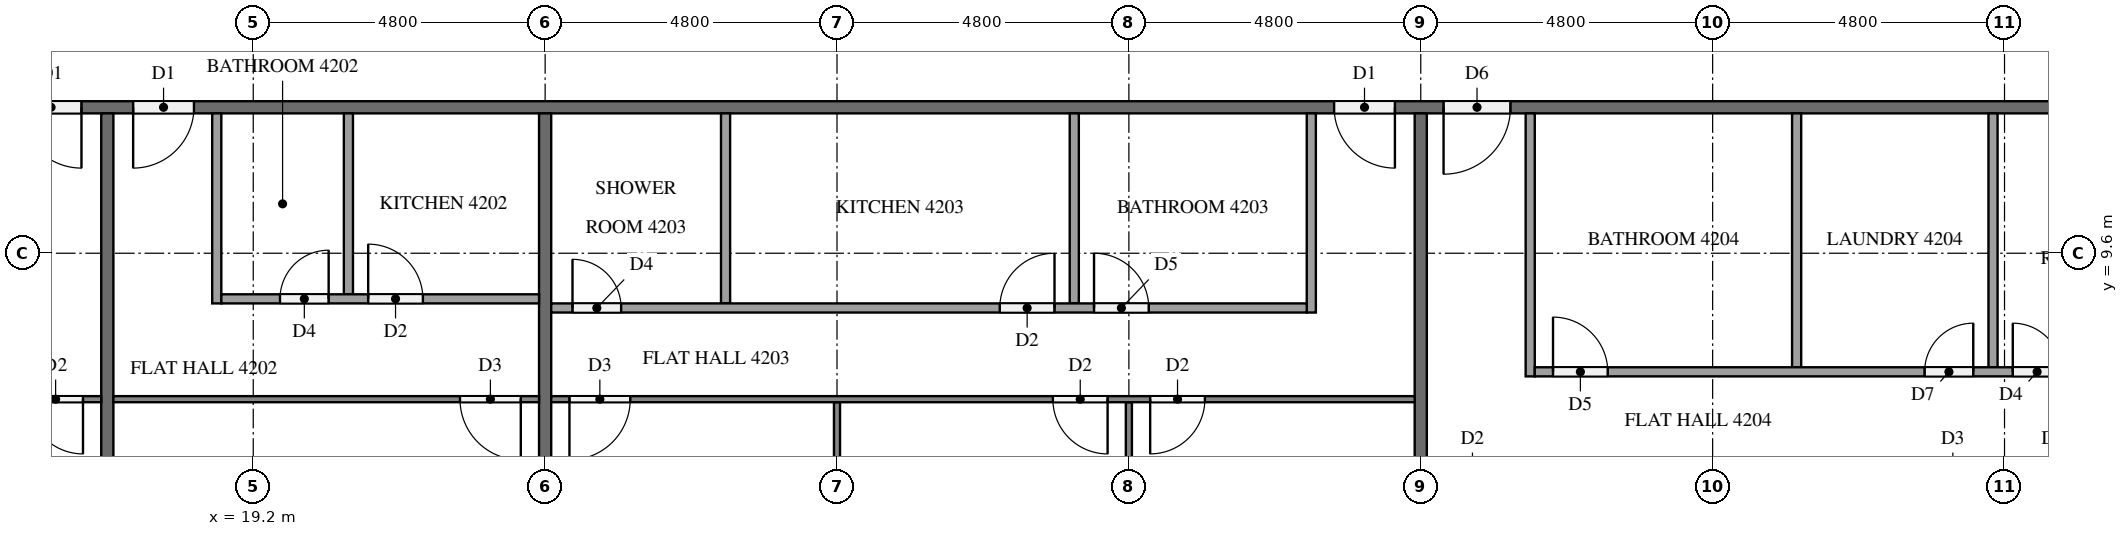
"""IFC4 building model, lengths in metres.
Left out: names, types, materials, properties, quantities, classifications, styles, units other than length and angle.
Written with IfcOpenShell. Run it as: python <this file> out.ifc"""

import sys

from ifc_helpers import new_model, si_unit, direction, frame, frame_2d, origin, place, context, subcontext, project, spatial, rectangle, extrude, element, fill, save


model = new_model("IFC4")
c1 = context("Model", 3, precision=1e-05, world=origin(), true_north=direction((0.0, 1.0)))
c2 = subcontext(c1, "Body", "Model", "MODEL_VIEW")
j1 = project(units=[si_unit("LENGTHUNIT", "METRE"), si_unit("PLANEANGLEUNIT", "RADIAN")], contexts=[c1])
p1 = place(None, origin())
s1 = spatial("IfcSite", under=j1, at=p1, CompositionType="ELEMENT")
p2 = place(p1, origin())
s2 = spatial("IfcBuilding", under=s1, at=p2, CompositionType="ELEMENT")
p3 = place(p2, frame((0.0, 0.0, 163.0)))
s3 = spatial("IfcBuildingStorey", under=s2, at=p3, CompositionType="ELEMENT", Elevation=163.0)
p4 = place(p3, frame((50.5, 12.0, 0.0), z_axis=(0.0, 0.0, 1.0), x_axis=(-1.0, 0.0, 0.0)))
e1 = element("IfcWall", 1, at=p4, inside=s3, PredefinedType="PARTITIONING", context=c2, shape_type="SweptSolid", body=[
    extrude(rectangle(XDim=38.6, YDim=0.2, at=frame_2d((19.3, 0.0))), origin(), (0.0, 0.0, 1.0), 3.2),
])
p5 = place(p4, frame((34.125, 0.0, 0.0)))
e2 = element("IfcOpeningElement", 2, at=p5, cuts=e1, PredefinedType="OPENING", context=c2, shape_type="SweptSolid", body=[
    extrude(rectangle(XDim=1.0, YDim=2.1, at=frame_2d((0.5, 1.05))), frame((0.0, 0.11, 0.0), z_axis=(0.0, -1.0, 0.0), x_axis=(1.0, 0.0, 0.0)), (0.0, 0.0, 1.0), 0.22),
])
p6 = place(p4, frame((32.275, 0.0, 0.0)))
e3 = element("IfcOpeningElement", 3, at=p6, cuts=e1, PredefinedType="OPENING", context=c2, shape_type="SweptSolid", body=[
    extrude(rectangle(XDim=1.0, YDim=2.1, at=frame_2d((0.5, 1.05))), frame((0.0, 0.11, 0.0), z_axis=(0.0, -1.0, 0.0), x_axis=(1.0, 0.0, 0.0)), (0.0, 0.0, 1.0), 0.22),
])
p7 = place(p4, frame((12.525, 0.0, 0.0)))
e4 = element("IfcOpeningElement", 4, at=p7, cuts=e1, PredefinedType="OPENING", context=c2, shape_type="SweptSolid", body=[
    extrude(rectangle(XDim=1.0, YDim=2.1, at=frame_2d((0.5, 1.05))), frame((0.0, 0.11, 0.0), z_axis=(0.0, -1.0, 0.0), x_axis=(1.0, 0.0, 0.0)), (0.0, 0.0, 1.0), 0.22),
])
p8 = place(p4, frame((10.625, 0.0, 0.0)))
e5 = element("IfcOpeningElement", 5, at=p8, cuts=e1, PredefinedType="OPENING", context=c2, shape_type="SweptSolid", body=[
    extrude(rectangle(XDim=1.1, YDim=2.1, at=frame_2d((0.55, 1.05))), frame((0.0, 0.11, 0.0), z_axis=(0.0, -1.0, 0.0), x_axis=(1.0, 0.0, 0.0)), (0.0, 0.0, 1.0), 0.22),
])
p9 = place(p3, frame((16.8, 11.9, 0.0), z_axis=(0.0, 0.0, 1.0), x_axis=(0.0, -1.0, 0.0)))
e6 = element("IfcWall", 6, at=p9, inside=s3, PredefinedType="PARTITIONING", context=c2, shape_type="SweptSolid", body=[
    extrude(rectangle(XDim=11.8, YDim=0.2, at=frame_2d((5.9, 0.0))), origin(), (0.0, 0.0, 1.0), 3.2),
])
p10 = place(p3, frame((24.0, 11.9, 0.0), z_axis=(0.0, 0.0, 1.0), x_axis=(0.0, -1.0, 0.0)))
e7 = element("IfcWall", 7, at=p10, inside=s3, PredefinedType="PARTITIONING", context=c2, shape_type="SweptSolid", body=[
    extrude(rectangle(XDim=11.525, YDim=0.2, at=frame_2d((5.762, 0.0))), origin(), (0.0, 0.0, 1.0), 3.2),
])
p11 = place(p3, frame((38.4, 11.9, 0.0), z_axis=(0.0, 0.0, 1.0), x_axis=(0.0, -1.0, 0.0)))
e8 = element("IfcWall", 8, at=p11, inside=s3, PredefinedType="PARTITIONING", context=c2, shape_type="SweptSolid", body=[
    extrude(rectangle(XDim=11.8, YDim=0.2, at=frame_2d((5.9, 0.0))), origin(), (0.0, 0.0, 1.0), 3.2),
])
p12 = place(p3, frame((16.7, 7.2, 0.0), z_axis=(0.0, 0.0, 1.0), x_axis=(-1.0, 0.0, 0.0)))
e9 = element("IfcWall", 9, at=p12, inside=s3, PredefinedType="PARTITIONING", context=c2, shape_type="SweptSolid", body=[
    extrude(rectangle(XDim=16.6, YDim=0.1, at=frame_2d((8.3, 0.0))), origin(), (0.0, 0.0, 1.0), 3.2),
])
p13 = place(p12, frame((0.3, 0.0, 0.0)))
e10 = element("IfcOpeningElement", 10, at=p13, cuts=e9, PredefinedType="OPENING", context=c2, shape_type="SweptSolid", body=[
    extrude(rectangle(XDim=0.9, YDim=2.1, at=frame_2d((0.45, 1.05))), frame((0.0, 0.06, 0.0), z_axis=(0.0, -1.0, 0.0), x_axis=(1.0, 0.0, 0.0)), (0.0, 0.0, 1.0), 0.12),
])
p14 = place(p12, frame((10.55, 0.0, 0.0)))
e11 = element("IfcOpeningElement", 11, at=p14, cuts=e9, PredefinedType="OPENING", context=c2, shape_type="SweptSolid", body=[
    extrude(rectangle(XDim=1.0, YDim=2.1, at=frame_2d((0.5, 1.05))), frame((0.0, 0.06, 0.0), z_axis=(0.0, -1.0, 0.0), x_axis=(1.0, 0.0, 0.0)), (0.0, 0.0, 1.0), 0.12),
])
p15 = place(p12, frame((12.25, 0.0, 0.0)))
e12 = element("IfcOpeningElement", 12, at=p15, cuts=e9, PredefinedType="OPENING", context=c2, shape_type="SweptSolid", body=[
    extrude(rectangle(XDim=0.9, YDim=2.1, at=frame_2d((0.45, 1.05))), frame((0.0, 0.06, 0.0), z_axis=(0.0, -1.0, 0.0), x_axis=(1.0, 0.0, 0.0)), (0.0, 0.0, 1.0), 0.12),
])
p16 = place(p3, frame((23.9, 7.2, 0.0), z_axis=(0.0, 0.0, 1.0), x_axis=(-1.0, 0.0, 0.0)))
e13 = element("IfcWall", 13, at=p16, inside=s3, PredefinedType="PARTITIONING", context=c2, shape_type="SweptSolid", body=[
    extrude(rectangle(XDim=7.0, YDim=0.1, at=frame_2d((3.5, 0.0))), origin(), (0.0, 0.0, 1.0), 3.2),
])
p17 = place(p16, frame((0.3, 0.0, 0.0)))
e14 = element("IfcOpeningElement", 14, at=p17, cuts=e13, PredefinedType="OPENING", context=c2, shape_type="SweptSolid", body=[
    extrude(rectangle(XDim=1.0, YDim=2.1, at=frame_2d((0.5, 1.05))), frame((0.0, 0.06, 0.0), z_axis=(0.0, -1.0, 0.0), x_axis=(1.0, 0.0, 0.0)), (0.0, 0.0, 1.0), 0.12),
])
p18 = place(p3, frame((20.765, 11.9, 0.0), z_axis=(0.0, 0.0, 1.0), x_axis=(0.0, -1.0, 0.0)))
e15 = element("IfcWall", 15, at=p18, inside=s3, PredefinedType="PARTITIONING", context=c2, shape_type="SweptSolid", body=[
    extrude(rectangle(XDim=2.975, YDim=0.15, at=frame_2d((1.487, 0.0))), origin(), (0.0, 0.0, 1.0), 3.2),
])
p19 = place(p3, frame((18.6, 11.9, 0.0), z_axis=(0.0, 0.0, 1.0), x_axis=(0.0, -1.0, 0.0)))
e16 = element("IfcWall", 16, at=p19, inside=s3, PredefinedType="PARTITIONING", context=c2, shape_type="SweptSolid", body=[
    extrude(rectangle(XDim=3.125, YDim=0.15, at=frame_2d((1.562, 0.0))), origin(), (0.0, 0.0, 1.0), 3.2),
])
p20 = place(p3, frame((18.675, 8.85, 0.0), z_axis=(0.0, 0.0, 1.0), x_axis=(1.0, 0.0, 0.0)))
e17 = element("IfcWall", 17, at=p20, inside=s3, PredefinedType="PARTITIONING", context=c2, shape_type="SweptSolid", body=[
    extrude(rectangle(XDim=5.225, YDim=0.15, at=frame_2d((2.612, 0.0))), origin(), (0.0, 0.0, 1.0), 3.2),
])
p21 = place(p20, frame((0.965, 0.0, 0.0)))
e18 = element("IfcOpeningElement", 18, at=p21, cuts=e17, PredefinedType="OPENING", context=c2, shape_type="SweptSolid", body=[
    extrude(rectangle(XDim=0.8, YDim=2.1, at=frame_2d((0.4, 1.05))), frame((0.0, 0.085, 0.0), z_axis=(0.0, -1.0, 0.0), x_axis=(1.0, 0.0, 0.0)), (0.0, 0.0, 1.0), 0.17),
])
p22 = place(p20, frame((2.415, 0.0, 0.0)))
e19 = element("IfcOpeningElement", 19, at=p22, cuts=e17, PredefinedType="OPENING", context=c2, shape_type="SweptSolid", body=[
    extrude(rectangle(XDim=0.9, YDim=2.1, at=frame_2d((0.45, 1.05))), frame((0.0, 0.085, 0.0), z_axis=(0.0, -1.0, 0.0), x_axis=(1.0, 0.0, 0.0)), (0.0, 0.0, 1.0), 0.17),
])
p23 = place(p3, frame((33.6, 7.15, 0.0), z_axis=(0.0, 0.0, 1.0), x_axis=(0.0, -1.0, 0.0)))
e20 = element("IfcWall", 20, at=p23, inside=s3, PredefinedType="PARTITIONING", context=c2, shape_type="SweptSolid", body=[
    extrude(rectangle(XDim=6.775, YDim=0.1, at=frame_2d((3.387, 0.0))), origin(), (0.0, 0.0, 1.0), 3.2),
])
p24 = place(p3, frame((28.8, 7.15, 0.0), z_axis=(0.0, 0.0, 1.0), x_axis=(0.0, -1.0, 0.0)))
e21 = element("IfcWall", 21, at=p24, inside=s3, PredefinedType="PARTITIONING", context=c2, shape_type="SweptSolid", body=[
    extrude(rectangle(XDim=7.05, YDim=0.1, at=frame_2d((3.525, 0.0))), origin(), (0.0, 0.0, 1.0), 3.2),
])
p25 = place(p3, frame((38.3, 7.2, 0.0), z_axis=(0.0, 0.0, 1.0), x_axis=(-1.0, 0.0, 0.0)))
e22 = element("IfcWall", 22, at=p25, inside=s3, PredefinedType="PARTITIONING", context=c2, shape_type="SweptSolid", body=[
    extrude(rectangle(XDim=14.2, YDim=0.1, at=frame_2d((7.1, 0.0))), origin(), (0.0, 0.0, 1.0), 3.2),
])
p26 = place(p25, frame((3.45, 0.0, 0.0)))
e23 = element("IfcOpeningElement", 23, at=p26, cuts=e22, PredefinedType="OPENING", context=c2, shape_type="SweptSolid", body=[
    extrude(rectangle(XDim=0.9, YDim=2.1, at=frame_2d((0.45, 1.05))), frame((0.0, 0.06, 0.0), z_axis=(0.0, -1.0, 0.0), x_axis=(1.0, 0.0, 0.0)), (0.0, 0.0, 1.0), 0.12),
])
p27 = place(p25, frame((5.05, 0.0, 0.0)))
e24 = element("IfcOpeningElement", 24, at=p27, cuts=e22, PredefinedType="OPENING", context=c2, shape_type="SweptSolid", body=[
    extrude(rectangle(XDim=0.9, YDim=2.1, at=frame_2d((0.45, 1.05))), frame((0.0, 0.06, 0.0), z_axis=(0.0, -1.0, 0.0), x_axis=(1.0, 0.0, 0.0)), (0.0, 0.0, 1.0), 0.12),
])
p28 = place(p25, frame((12.9, 0.0, 0.0)))
e25 = element("IfcOpeningElement", 25, at=p28, cuts=e22, PredefinedType="OPENING", context=c2, shape_type="SweptSolid", body=[
    extrude(rectangle(XDim=1.0, YDim=2.1, at=frame_2d((0.5, 1.05))), frame((0.0, 0.06, 0.0), z_axis=(0.0, -1.0, 0.0), x_axis=(1.0, 0.0, 0.0)), (0.0, 0.0, 1.0), 0.12),
])
for number, where, z_axis, x_axis in (
    (26, (32.702, 11.9, 0.0), (0.0, 0.0, 1.0), (0.0, -1.0, 0.0)),
    (27, (26.967, 11.9, 0.0), (0.0, 0.0, 1.0), (0.0, -1.0, 0.0)),
):
    element("IfcWall", number, at=place(p3, frame(where, z_axis=z_axis, x_axis=x_axis)), inside=s3, PredefinedType="PARTITIONING", context=c2, shape_type="SweptSolid", body=[
        extrude(rectangle(XDim=3.125, YDim=0.15, at=frame_2d((1.562, 0.0))), origin(), (0.0, 0.0, 1.0), 3.2),
    ])
p29 = place(p3, frame((36.6, 11.9, 0.0), z_axis=(0.0, 0.0, 1.0), x_axis=(0.0, -1.0, 0.0)))
e28 = element("IfcWall", 28, at=p29, inside=s3, PredefinedType="PARTITIONING", context=c2, shape_type="SweptSolid", body=[
    extrude(rectangle(XDim=3.275, YDim=0.15, at=frame_2d((1.637, 0.0))), origin(), (0.0, 0.0, 1.0), 3.2),
])
p30 = place(p3, frame((24.1, 8.7, 0.0), z_axis=(0.0, 0.0, 1.0), x_axis=(1.0, 0.0, 0.0)))
e29 = element("IfcWall", 29, at=p30, inside=s3, PredefinedType="PARTITIONING", context=c2, shape_type="SweptSolid", body=[
    extrude(rectangle(XDim=12.425, YDim=0.15, at=frame_2d((6.212, 0.0))), origin(), (0.0, 0.0, 1.0), 3.2),
])
p31 = place(p30, frame((8.927, 0.0, 0.0)))
e30 = element("IfcOpeningElement", 30, at=p31, cuts=e29, PredefinedType="OPENING", context=c2, shape_type="SweptSolid", body=[
    extrude(rectangle(XDim=0.9, YDim=2.1, at=frame_2d((0.45, 1.05))), frame((0.0, 0.085, 0.0), z_axis=(0.0, -1.0, 0.0), x_axis=(1.0, 0.0, 0.0)), (0.0, 0.0, 1.0), 0.17),
])
p32 = place(p30, frame((7.377, 0.0, 0.0)))
e31 = element("IfcOpeningElement", 31, at=p32, cuts=e29, PredefinedType="OPENING", context=c2, shape_type="SweptSolid", body=[
    extrude(rectangle(XDim=0.9, YDim=2.1, at=frame_2d((0.45, 1.05))), frame((0.0, 0.085, 0.0), z_axis=(0.0, -1.0, 0.0), x_axis=(1.0, 0.0, 0.0)), (0.0, 0.0, 1.0), 0.17),
])
p33 = place(p30, frame((0.35, 0.0, 0.0)))
e32 = element("IfcOpeningElement", 32, at=p33, cuts=e29, PredefinedType="OPENING", context=c2, shape_type="SweptSolid", body=[
    extrude(rectangle(XDim=0.8, YDim=2.1, at=frame_2d((0.4, 1.05))), frame((0.0, 0.085, 0.0), z_axis=(0.0, -1.0, 0.0), x_axis=(1.0, 0.0, 0.0)), (0.0, 0.0, 1.0), 0.17),
])
for number, where, z_axis, x_axis in (
    (33, (44.581, 11.9, 0.0), (0.0, 0.0, 1.0), (0.0, -1.0, 0.0)),
    (34, (47.811, 11.9, 0.0), (0.0, 0.0, 1.0), (0.0, -1.0, 0.0)),
):
    element("IfcWall", number, at=place(p3, frame(where, z_axis=z_axis, x_axis=x_axis)), inside=s3, PredefinedType="PARTITIONING", context=c2, shape_type="SweptSolid", body=[
        extrude(rectangle(XDim=4.175, YDim=0.15, at=frame_2d((2.087, 0.0))), origin(), (0.0, 0.0, 1.0), 3.2),
    ])
p34 = place(p3, frame((40.2, 11.9, 0.0), z_axis=(0.0, 0.0, 1.0), x_axis=(0.0, -1.0, 0.0)))
e35 = element("IfcWall", 35, at=p34, inside=s3, PredefinedType="PARTITIONING", context=c2, shape_type="SweptSolid", body=[
    extrude(rectangle(XDim=4.325, YDim=0.15, at=frame_2d((2.163, 0.0))), origin(), (0.0, 0.0, 1.0), 3.2),
])
p35 = place(p3, frame((40.275, 7.65, 0.0), z_axis=(0.0, 0.0, 1.0), x_axis=(1.0, 0.0, 0.0)))
e36 = element("IfcWall", 36, at=p35, inside=s3, PredefinedType="PARTITIONING", context=c2, shape_type="SweptSolid", body=[
    extrude(rectangle(XDim=17.225, YDim=0.15, at=frame_2d((8.613, 0.0))), origin(), (0.0, 0.0, 1.0), 3.2),
])
p36 = place(p35, frame((0.3, 0.0, 0.0)))
e37 = element("IfcOpeningElement", 37, at=p36, cuts=e36, PredefinedType="OPENING", context=c2, shape_type="SweptSolid", body=[
    extrude(rectangle(XDim=0.9, YDim=2.1, at=frame_2d((0.45, 1.05))), frame((0.0, 0.085, 0.0), z_axis=(0.0, -1.0, 0.0), x_axis=(1.0, 0.0, 0.0)), (0.0, 0.0, 1.0), 0.17),
])
p37 = place(p35, frame((6.411, 0.0, 0.0)))
e38 = element("IfcOpeningElement", 38, at=p37, cuts=e36, PredefinedType="OPENING", context=c2, shape_type="SweptSolid", body=[
    extrude(rectangle(XDim=0.8, YDim=2.1, at=frame_2d((0.4, 1.05))), frame((0.0, 0.085, 0.0), z_axis=(0.0, -1.0, 0.0), x_axis=(1.0, 0.0, 0.0)), (0.0, 0.0, 1.0), 0.17),
])
p38 = place(p35, frame((7.861, 0.0, 0.0)))
e39 = element("IfcOpeningElement", 39, at=p38, cuts=e36, PredefinedType="OPENING", context=c2, shape_type="SweptSolid", body=[
    extrude(rectangle(XDim=0.8, YDim=2.1, at=frame_2d((0.4, 1.05))), frame((0.0, 0.085, 0.0), z_axis=(0.0, -1.0, 0.0), x_axis=(1.0, 0.0, 0.0)), (0.0, 0.0, 1.0), 0.17),
])
p39 = place(p35, frame((15.975, 0.0, 0.0)))
e40 = element("IfcOpeningElement", 40, at=p39, cuts=e36, PredefinedType="OPENING", context=c2, shape_type="SweptSolid", body=[
    extrude(rectangle(XDim=0.9, YDim=2.1, at=frame_2d((0.45, 1.05))), frame((0.0, 0.085, 0.0), z_axis=(0.0, -1.0, 0.0), x_axis=(1.0, 0.0, 0.0)), (0.0, 0.0, 1.0), 0.17),
])
p40 = place(p5, origin())
e41 = element("IfcDoor", 41, at=p40, inside=s3, OperationType="SINGLE_SWING_LEFT", PredefinedType="DOOR", context=c2, shape_type="SweptSolid", body=[
    extrude(rectangle(XDim=1.0, YDim=2.1, at=frame_2d((0.5, 1.05))), frame((0.0, 0.025, 0.0), z_axis=(0.0, -1.0, 0.0), x_axis=(1.0, 0.0, 0.0)), (0.0, 0.0, 1.0), 0.05),
])
fill(e2, e41)
p41 = place(p6, origin())
e42 = element("IfcDoor", 42, at=p41, inside=s3, OperationType="SINGLE_SWING_RIGHT", PredefinedType="DOOR", context=c2, shape_type="SweptSolid", body=[
    extrude(rectangle(XDim=1.0, YDim=2.1, at=frame_2d((0.5, 1.05))), frame((0.0, 0.025, 0.0), z_axis=(0.0, -1.0, 0.0), x_axis=(1.0, 0.0, 0.0)), (0.0, 0.0, 1.0), 0.05),
])
fill(e3, e42)
p42 = place(p7, origin())
e43 = element("IfcDoor", 43, at=p42, inside=s3, OperationType="SINGLE_SWING_LEFT", PredefinedType="DOOR", context=c2, shape_type="SweptSolid", body=[
    extrude(rectangle(XDim=1.0, YDim=2.1, at=frame_2d((0.5, 1.05))), frame((0.0, 0.025, 0.0), z_axis=(0.0, -1.0, 0.0), x_axis=(1.0, 0.0, 0.0)), (0.0, 0.0, 1.0), 0.05),
])
fill(e4, e43)
p43 = place(p8, origin())
e44 = element("IfcDoor", 44, at=p43, inside=s3, OperationType="SINGLE_SWING_RIGHT", PredefinedType="DOOR", context=c2, shape_type="SweptSolid", body=[
    extrude(rectangle(XDim=1.1, YDim=2.1, at=frame_2d((0.55, 1.05))), frame((0.0, 0.025, 0.0), z_axis=(0.0, -1.0, 0.0), x_axis=(1.0, 0.0, 0.0)), (0.0, 0.0, 1.0), 0.05),
])
fill(e5, e44)
p44 = place(p13, origin())
e45 = element("IfcDoor", 45, at=p44, inside=s3, OperationType="SINGLE_SWING_LEFT", PredefinedType="DOOR", context=c2, shape_type="SweptSolid", body=[
    extrude(rectangle(XDim=0.9, YDim=2.1, at=frame_2d((0.45, 1.05))), frame((0.0, 0.025, 0.0), z_axis=(0.0, -1.0, 0.0), x_axis=(1.0, 0.0, 0.0)), (0.0, 0.0, 1.0), 0.05),
])
fill(e10, e45)
p45 = place(p17, origin())
e46 = element("IfcDoor", 46, at=p45, inside=s3, OperationType="SINGLE_SWING_LEFT", PredefinedType="DOOR", context=c2, shape_type="SweptSolid", body=[
    extrude(rectangle(XDim=1.0, YDim=2.1, at=frame_2d((0.5, 1.05))), frame((0.0, 0.025, 0.0), z_axis=(0.0, -1.0, 0.0), x_axis=(1.0, 0.0, 0.0)), (0.0, 0.0, 1.0), 0.05),
])
fill(e14, e46)
p46 = place(p21, origin())
e47 = element("IfcDoor", 47, at=p46, inside=s3, OperationType="SINGLE_SWING_RIGHT", PredefinedType="DOOR", context=c2, shape_type="SweptSolid", body=[
    extrude(rectangle(XDim=0.8, YDim=2.1, at=frame_2d((0.4, 1.05))), frame((0.0, 0.025, 0.0), z_axis=(0.0, -1.0, 0.0), x_axis=(1.0, 0.0, 0.0)), (0.0, 0.0, 1.0), 0.05),
])
fill(e18, e47)
p47 = place(p22, origin())
e48 = element("IfcDoor", 48, at=p47, inside=s3, OperationType="SINGLE_SWING_LEFT", PredefinedType="DOOR", context=c2, shape_type="SweptSolid", body=[
    extrude(rectangle(XDim=0.9, YDim=2.1, at=frame_2d((0.45, 1.05))), frame((0.0, 0.025, 0.0), z_axis=(0.0, -1.0, 0.0), x_axis=(1.0, 0.0, 0.0)), (0.0, 0.0, 1.0), 0.05),
])
fill(e19, e48)
p48 = place(p26, origin())
e49 = element("IfcDoor", 49, at=p48, inside=s3, OperationType="SINGLE_SWING_RIGHT", PredefinedType="DOOR", context=c2, shape_type="SweptSolid", body=[
    extrude(rectangle(XDim=0.9, YDim=2.1, at=frame_2d((0.45, 1.05))), frame((0.0, 0.025, 0.0), z_axis=(0.0, -1.0, 0.0), x_axis=(1.0, 0.0, 0.0)), (0.0, 0.0, 1.0), 0.05),
])
fill(e23, e49)
p49 = place(p27, origin())
e50 = element("IfcDoor", 50, at=p49, inside=s3, OperationType="SINGLE_SWING_LEFT", PredefinedType="DOOR", context=c2, shape_type="SweptSolid", body=[
    extrude(rectangle(XDim=0.9, YDim=2.1, at=frame_2d((0.45, 1.05))), frame((0.0, 0.025, 0.0), z_axis=(0.0, -1.0, 0.0), x_axis=(1.0, 0.0, 0.0)), (0.0, 0.0, 1.0), 0.05),
])
fill(e24, e50)
p50 = place(p28, origin())
e51 = element("IfcDoor", 51, at=p50, inside=s3, OperationType="SINGLE_SWING_RIGHT", PredefinedType="DOOR", context=c2, shape_type="SweptSolid", body=[
    extrude(rectangle(XDim=1.0, YDim=2.1, at=frame_2d((0.5, 1.05))), frame((0.0, 0.025, 0.0), z_axis=(0.0, -1.0, 0.0), x_axis=(1.0, 0.0, 0.0)), (0.0, 0.0, 1.0), 0.05),
])
fill(e25, e51)
p51 = place(p31, origin())
e52 = element("IfcDoor", 52, at=p51, inside=s3, OperationType="SINGLE_SWING_LEFT", PredefinedType="DOOR", context=c2, shape_type="SweptSolid", body=[
    extrude(rectangle(XDim=0.9, YDim=2.1, at=frame_2d((0.45, 1.05))), frame((0.0, 0.025, 0.0), z_axis=(0.0, -1.0, 0.0), x_axis=(1.0, 0.0, 0.0)), (0.0, 0.0, 1.0), 0.05),
])
fill(e30, e52)
p52 = place(p32, origin())
e53 = element("IfcDoor", 53, at=p52, inside=s3, OperationType="SINGLE_SWING_RIGHT", PredefinedType="DOOR", context=c2, shape_type="SweptSolid", body=[
    extrude(rectangle(XDim=0.9, YDim=2.1, at=frame_2d((0.45, 1.05))), frame((0.0, 0.025, 0.0), z_axis=(0.0, -1.0, 0.0), x_axis=(1.0, 0.0, 0.0)), (0.0, 0.0, 1.0), 0.05),
])
fill(e31, e53)
p53 = place(p33, origin())
e54 = element("IfcDoor", 54, at=p53, inside=s3, OperationType="SINGLE_SWING_LEFT", PredefinedType="DOOR", context=c2, shape_type="SweptSolid", body=[
    extrude(rectangle(XDim=0.8, YDim=2.1, at=frame_2d((0.4, 1.05))), frame((0.0, 0.025, 0.0), z_axis=(0.0, -1.0, 0.0), x_axis=(1.0, 0.0, 0.0)), (0.0, 0.0, 1.0), 0.05),
])
fill(e32, e54)
p54 = place(p36, origin())
e55 = element("IfcDoor", 55, at=p54, inside=s3, OperationType="SINGLE_SWING_LEFT", PredefinedType="DOOR", context=c2, shape_type="SweptSolid", body=[
    extrude(rectangle(XDim=0.9, YDim=2.1, at=frame_2d((0.45, 1.05))), frame((0.0, 0.025, 0.0), z_axis=(0.0, -1.0, 0.0), x_axis=(1.0, 0.0, 0.0)), (0.0, 0.0, 1.0), 0.05),
])
fill(e37, e55)
p55 = place(p37, origin())
e56 = element("IfcDoor", 56, at=p55, inside=s3, OperationType="SINGLE_SWING_RIGHT", PredefinedType="DOOR", context=c2, shape_type="SweptSolid", body=[
    extrude(rectangle(XDim=0.8, YDim=2.1, at=frame_2d((0.4, 1.05))), frame((0.0, 0.025, 0.0), z_axis=(0.0, -1.0, 0.0), x_axis=(1.0, 0.0, 0.0)), (0.0, 0.0, 1.0), 0.05),
])
fill(e38, e56)
p56 = place(p38, origin())
e57 = element("IfcDoor", 57, at=p56, inside=s3, OperationType="SINGLE_SWING_LEFT", PredefinedType="DOOR", context=c2, shape_type="SweptSolid", body=[
    extrude(rectangle(XDim=0.8, YDim=2.1, at=frame_2d((0.4, 1.05))), frame((0.0, 0.025, 0.0), z_axis=(0.0, -1.0, 0.0), x_axis=(1.0, 0.0, 0.0)), (0.0, 0.0, 1.0), 0.05),
])
fill(e39, e57)
save(model, sys.argv[1])
